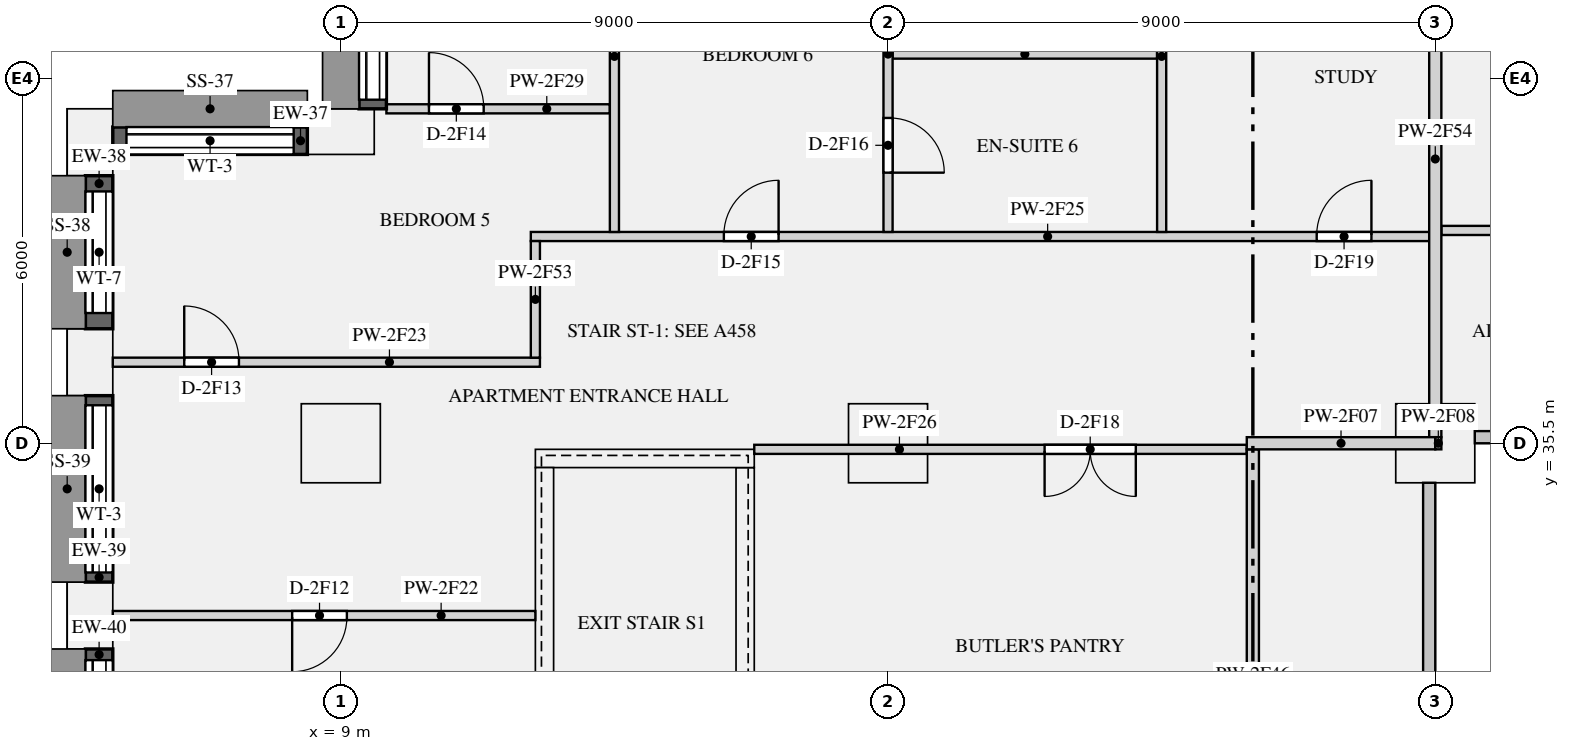
"""IFC4 building model, lengths in metres.
Left out: names, types, materials, properties, quantities, classifications, styles, units other than length and angle.
Written with IfcOpenShell. Run it as: python <this file> out.ifc"""

import sys

from ifc_helpers import new_model, si_unit, direction, frame, frame_2d, origin, origin_2d, place, context, subcontext, project, spatial, rectangle, extrude, element, fill, save


model = new_model("IFC4")
c1 = context("Model", 3, precision=1e-05, world=origin(), true_north=direction((0.0, 1.0)))
c2 = subcontext(c1, "Body", "Model", "MODEL_VIEW")
j1 = project(units=[si_unit("LENGTHUNIT", "METRE"), si_unit("PLANEANGLEUNIT", "RADIAN")], contexts=[c1])
p1 = place(None, origin())
s1 = spatial("IfcSite", under=j1, at=p1, CompositionType="ELEMENT")
p2 = place(p1, origin())
s2 = spatial("IfcBuilding", under=s1, at=p2, CompositionType="ELEMENT")
p3 = place(p2, frame((0.0, 0.0, 127.65)))
s3 = spatial("IfcBuildingStorey", under=s2, at=p3, CompositionType="ELEMENT", Elevation=127.65)
for number, where, z_axis, x_axis in (
    (1, (9.0, 40.625, 0.0), (0.0, 0.0, 1.0), (-1.0, 0.0, 0.0)),
    (2, (4.875, 40.45, 0.0), (0.0, 0.0, 1.0), (0.0, -1.0, 0.0)),
    (3, (4.875, 36.833, 0.0), (0.0, 0.0, 1.0), (0.0, -1.0, 0.0)),
    (4, (4.875, 32.667, 0.0), (0.0, 0.0, 1.0), (0.0, -1.0, 0.0)),
):
    element("IfcColumn", number, at=place(p3, frame(where, z_axis=z_axis, x_axis=x_axis)), inside=s3, PredefinedType="USERDEFINED", context=c2, shape_type="SweptSolid", body=[
        extrude(rectangle(XDim=1.1, YDim=0.75, at=origin_2d()), origin(), (0.0, 0.0, 1.0), 3.15),
    ])
for number, where, z_axis, x_axis in (
    (5, (9.0, 35.5, 0.0), (0.0, 0.0, 1.0), (1.0, 0.0, 0.0)),
    (6, (18.0, 35.5, 0.0), (0.0, 0.0, 1.0), (1.0, 0.0, 0.0)),
    (7, (27.0, 35.5, 0.0), (0.0, 0.0, 1.0), (1.0, 0.0, 0.0)),
):
    element("IfcColumn", number, at=place(p3, frame(where, z_axis=z_axis, x_axis=x_axis)), inside=s3, PredefinedType="COLUMN", context=c2, shape_type="SweptSolid", body=[
        extrude(rectangle(XDim=1.3, YDim=1.3, at=origin_2d()), origin(), (0.0, 0.0, 1.0), 3.15),
    ])
p4 = place(p3, frame((12.2, 35.25, 0.0), z_axis=(0.0, 0.0, 1.0), x_axis=(1.0, 0.0, 0.0)))
e8 = element("IfcWall", 8, at=p4, inside=s3, PredefinedType="SHEAR", context=c2, shape_type="SweptSolid", body=[
    extrude(rectangle(XDim=3.6, YDim=0.3, at=frame_2d((1.8, 0.0))), origin(), (0.0, 0.0, 1.0), 3.15),
])
for number, where, z_axis, x_axis in (
    (9, (12.35, 27.3, 0.0), (0.0, 0.0, 1.0), (0.0, 1.0, 0.0)),
    (10, (15.65, 27.3, 0.0), (0.0, 0.0, 1.0), (0.0, 1.0, 0.0)),
):
    element("IfcWall", number, at=place(p3, frame(where, z_axis=z_axis, x_axis=x_axis)), inside=s3, PredefinedType="SHEAR", context=c2, shape_type="SweptSolid", body=[
        extrude(rectangle(XDim=7.8, YDim=0.3, at=frame_2d((3.9, 0.0))), origin(), (0.0, 0.0, 1.0), 3.15),
    ])
p5 = place(p3, frame((9.525, 44.4, 0.9), z_axis=(0.0, 0.0, 1.0), x_axis=(0.0, -1.0, 0.0)))
e11 = element("IfcWall", 11, at=p5, inside=s3, PredefinedType="SOLIDWALL", context=c2, shape_type="SweptSolid", body=[
    extrude(rectangle(XDim=3.4, YDim=0.45, at=frame_2d((1.7, 0.0))), origin(), (0.0, 0.0, 1.0), 1.75),
])
p6 = place(p5, frame((0.15, 0.0, 0.15)))
e12 = element("IfcOpeningElement", 12, at=p6, cuts=e11, PredefinedType="OPENING", context=c2, shape_type="SweptSolid", body=[
    extrude(rectangle(XDim=3.1, YDim=1.5, at=frame_2d((1.55, 0.75))), frame((0.0, 0.235, 0.0), z_axis=(0.0, -1.0, 0.0), x_axis=(1.0, 0.0, 0.0)), (0.0, 0.0, 1.0), 0.47),
])
p7 = place(p3, frame((8.45, 40.475, 0.9), z_axis=(0.0, 0.0, 1.0), x_axis=(-1.0, 0.0, 0.0)))
e13 = element("IfcWall", 13, at=p7, inside=s3, PredefinedType="SOLIDWALL", context=c2, shape_type="SweptSolid", body=[
    extrude(rectangle(XDim=3.2, YDim=0.45, at=frame_2d((1.6, 0.0))), origin(), (0.0, 0.0, 1.0), 1.75),
])
p8 = place(p7, frame((0.225, 0.0, 0.15)))
e14 = element("IfcOpeningElement", 14, at=p8, cuts=e13, PredefinedType="OPENING", context=c2, shape_type="SweptSolid", body=[
    extrude(rectangle(XDim=2.75, YDim=1.5, at=frame_2d((1.375, 0.75))), frame((0.0, 0.235, 0.0), z_axis=(0.0, -1.0, 0.0), x_axis=(1.0, 0.0, 0.0)), (0.0, 0.0, 1.0), 0.47),
])
p9 = place(p3, frame((5.025, 39.9, 0.9), z_axis=(0.0, 0.0, 1.0), x_axis=(0.0, -1.0, 0.0)))
e15 = element("IfcWall", 15, at=p9, inside=s3, PredefinedType="SOLIDWALL", context=c2, shape_type="SweptSolid", body=[
    extrude(rectangle(XDim=2.517, YDim=0.45, at=frame_2d((1.258, 0.0))), origin(), (0.0, 0.0, 1.0), 1.75),
])
p10 = place(p9, frame((0.259, 0.0, 0.15)))
e16 = element("IfcOpeningElement", 16, at=p10, cuts=e15, PredefinedType="OPENING", context=c2, shape_type="SweptSolid", body=[
    extrude(rectangle(XDim=2.0, YDim=1.5, at=frame_2d((1.0, 0.75))), frame((0.0, 0.235, 0.0), z_axis=(0.0, -1.0, 0.0), x_axis=(1.0, 0.0, 0.0)), (0.0, 0.0, 1.0), 0.47),
])
p11 = place(p3, frame((5.025, 36.283, 0.9), z_axis=(0.0, 0.0, 1.0), x_axis=(0.0, -1.0, 0.0)))
e17 = element("IfcWall", 17, at=p11, inside=s3, PredefinedType="SOLIDWALL", context=c2, shape_type="SweptSolid", body=[
    extrude(rectangle(XDim=3.066, YDim=0.45, at=frame_2d((1.533, 0.0))), origin(), (0.0, 0.0, 1.0), 1.75),
])
p12 = place(p11, frame((0.158, 0.0, 0.15)))
e18 = element("IfcOpeningElement", 18, at=p12, cuts=e17, PredefinedType="OPENING", context=c2, shape_type="SweptSolid", body=[
    extrude(rectangle(XDim=2.75, YDim=1.5, at=frame_2d((1.375, 0.75))), frame((0.0, 0.235, 0.0), z_axis=(0.0, -1.0, 0.0), x_axis=(1.0, 0.0, 0.0)), (0.0, 0.0, 1.0), 0.47),
])
p13 = place(p3, frame((5.025, 32.117, 0.9), z_axis=(0.0, 0.0, 1.0), x_axis=(0.0, -1.0, 0.0)))
e19 = element("IfcWall", 19, at=p13, inside=s3, PredefinedType="SOLIDWALL", context=c2, shape_type="SweptSolid", body=[
    extrude(rectangle(XDim=2.867, YDim=0.45, at=frame_2d((1.434, 0.0))), origin(), (0.0, 0.0, 1.0), 1.75),
])
p14 = place(p13, frame((0.184, 0.0, 0.15)))
e20 = element("IfcOpeningElement", 20, at=p14, cuts=e19, PredefinedType="OPENING", context=c2, shape_type="SweptSolid", body=[
    extrude(rectangle(XDim=2.5, YDim=1.5, at=frame_2d((1.25, 0.75))), frame((0.0, 0.235, 0.0), z_axis=(0.0, -1.0, 0.0), x_axis=(1.0, 0.0, 0.0)), (0.0, 0.0, 1.0), 0.47),
])
p15 = place(p3, frame((23.9, 35.5, 0.0), z_axis=(0.0, 0.0, 1.0), x_axis=(1.0, 0.0, 0.0)))
e21 = element("IfcWall", 21, at=p15, inside=s3, PredefinedType="PARTITIONING", context=c2, shape_type="SweptSolid", body=[
    extrude(rectangle(XDim=3.1, YDim=0.2, at=frame_2d((1.55, 0.0))), origin(), (0.0, 0.0, 1.0), 2.65),
])
p16 = place(p3, frame((27.0, 35.5, 0.0), z_axis=(0.0, 0.0, 1.0), x_axis=(1.0, 0.0, 0.0)))
e22 = element("IfcWall", 22, at=p16, inside=s3, PredefinedType="PARTITIONING", context=c2, shape_type="SweptSolid", body=[
    extrude(rectangle(XDim=0.1, YDim=0.2, at=frame_2d((0.05, 0.0))), origin(), (0.0, 0.0, 1.0), 2.65),
])
p17 = place(p3, frame((5.25, 32.667, 0.0), z_axis=(0.0, 0.0, 1.0), x_axis=(1.0, 0.0, 0.0)))
e23 = element("IfcWall", 23, at=p17, inside=s3, PredefinedType="PARTITIONING", context=c2, shape_type="SweptSolid", body=[
    extrude(rectangle(XDim=6.95, YDim=0.15, at=frame_2d((3.475, 0.0))), origin(), (0.0, 0.0, 1.0), 2.65),
])
p18 = place(p17, frame((2.95, 0.0, 0.0)))
e24 = element("IfcOpeningElement", 24, at=p18, cuts=e23, PredefinedType="OPENING", context=c2, shape_type="SweptSolid", body=[
    extrude(rectangle(XDim=0.9, YDim=2.1, at=frame_2d((0.45, 1.05))), frame((0.0, 0.085, 0.0), z_axis=(0.0, -1.0, 0.0), x_axis=(1.0, 0.0, 0.0)), (0.0, 0.0, 1.0), 0.17),
])
p19 = place(p3, frame((5.25, 36.833, 0.0), z_axis=(0.0, 0.0, 1.0), x_axis=(1.0, 0.0, 0.0)))
e25 = element("IfcWall", 25, at=p19, inside=s3, PredefinedType="PARTITIONING", context=c2, shape_type="SweptSolid", body=[
    extrude(rectangle(XDim=7.025, YDim=0.15, at=frame_2d((3.512, 0.0))), origin(), (0.0, 0.0, 1.0), 2.65),
])
p20 = place(p19, frame((1.175, 0.0, 0.0)))
e26 = element("IfcOpeningElement", 26, at=p20, cuts=e25, PredefinedType="OPENING", context=c2, shape_type="SweptSolid", body=[
    extrude(rectangle(XDim=0.9, YDim=2.1, at=frame_2d((0.45, 1.05))), frame((0.0, 0.085, 0.0), z_axis=(0.0, -1.0, 0.0), x_axis=(1.0, 0.0, 0.0)), (0.0, 0.0, 1.0), 0.17),
])
p21 = place(p3, frame((12.125, 38.9, 0.0), z_axis=(0.0, 0.0, 1.0), x_axis=(1.0, 0.0, 0.0)))
e27 = element("IfcWall", 27, at=p21, inside=s3, PredefinedType="PARTITIONING", context=c2, shape_type="SweptSolid", body=[
    extrude(rectangle(XDim=14.775, YDim=0.15, at=frame_2d((7.387, 0.0))), origin(), (0.0, 0.0, 1.0), 2.65),
])
p22 = place(p21, frame((3.175, 0.0, 0.0)))
e28 = element("IfcOpeningElement", 28, at=p22, cuts=e27, PredefinedType="OPENING", context=c2, shape_type="SweptSolid", body=[
    extrude(rectangle(XDim=0.9, YDim=2.1, at=frame_2d((0.45, 1.05))), frame((0.0, 0.085, 0.0), z_axis=(0.0, -1.0, 0.0), x_axis=(1.0, 0.0, 0.0)), (0.0, 0.0, 1.0), 0.17),
])
p23 = place(p21, frame((12.925, 0.0, 0.0)))
e29 = element("IfcOpeningElement", 29, at=p23, cuts=e27, PredefinedType="OPENING", context=c2, shape_type="SweptSolid", body=[
    extrude(rectangle(XDim=0.9, YDim=2.1, at=frame_2d((0.45, 1.05))), frame((0.0, 0.085, 0.0), z_axis=(0.0, -1.0, 0.0), x_axis=(1.0, 0.0, 0.0)), (0.0, 0.0, 1.0), 0.17),
])
p24 = place(p3, frame((15.8, 35.4, 0.0), z_axis=(0.0, 0.0, 1.0), x_axis=(1.0, 0.0, 0.0)))
e30 = element("IfcWall", 30, at=p24, inside=s3, PredefinedType="PARTITIONING", context=c2, shape_type="SweptSolid", body=[
    extrude(rectangle(XDim=8.1, YDim=0.15, at=frame_2d((4.05, 0.0))), origin(), (0.0, 0.0, 1.0), 2.65),
])
p25 = place(p24, frame((4.775, 0.0, 0.0)))
e31 = element("IfcOpeningElement", 31, at=p25, cuts=e30, PredefinedType="OPENING", context=c2, shape_type="SweptSolid", body=[
    extrude(rectangle(XDim=1.5, YDim=2.1, at=frame_2d((0.75, 1.05))), frame((0.0, 0.085, 0.0), z_axis=(0.0, -1.0, 0.0), x_axis=(1.0, 0.0, 0.0)), (0.0, 0.0, 1.0), 0.17),
])
p26 = place(p3, frame((9.75, 41.0, 0.0), z_axis=(0.0, 0.0, 1.0), x_axis=(1.0, 0.0, 0.0)))
e32 = element("IfcWall", 32, at=p26, inside=s3, PredefinedType="PARTITIONING", context=c2, shape_type="SweptSolid", body=[
    extrude(rectangle(XDim=3.675, YDim=0.15, at=frame_2d((1.837, 0.0))), origin(), (0.0, 0.0, 1.0), 2.65),
])
p27 = place(p26, frame((0.7, 0.0, 0.0)))
e33 = element("IfcOpeningElement", 33, at=p27, cuts=e32, PredefinedType="OPENING", context=c2, shape_type="SweptSolid", body=[
    extrude(rectangle(XDim=0.9, YDim=2.1, at=frame_2d((0.45, 1.05))), frame((0.0, 0.085, 0.0), z_axis=(0.0, -1.0, 0.0), x_axis=(1.0, 0.0, 0.0)), (0.0, 0.0, 1.0), 0.17),
])
p28 = place(p3, frame((18.075, 41.9, 0.0), z_axis=(0.0, 0.0, 1.0), x_axis=(1.0, 0.0, 0.0)))
e34 = element("IfcWall", 34, at=p28, inside=s3, PredefinedType="PARTITIONING", context=c2, shape_type="SweptSolid", body=[
    extrude(rectangle(XDim=4.35, YDim=0.15, at=frame_2d((2.175, 0.0))), origin(), (0.0, 0.0, 1.0), 2.65),
])
p29 = place(p3, frame((27.1, 39.0, 0.0), z_axis=(0.0, 0.0, 1.0), x_axis=(1.0, 0.0, 0.0)))
e35 = element("IfcWall", 35, at=p29, inside=s3, PredefinedType="PARTITIONING", context=c2, shape_type="SweptSolid", body=[
    extrude(rectangle(XDim=22.475, YDim=0.15, at=frame_2d((11.237, 0.0))), origin(), (0.0, 0.0, 1.0), 2.65),
])
p30 = place(p29, frame((1.7, 0.0, 0.0)))
e36 = element("IfcOpeningElement", 36, at=p30, cuts=e35, PredefinedType="OPENING", context=c2, shape_type="SweptSolid", body=[
    extrude(rectangle(XDim=0.9, YDim=2.1, at=frame_2d((0.45, 1.05))), frame((0.0, 0.085, 0.0), z_axis=(0.0, -1.0, 0.0), x_axis=(1.0, 0.0, 0.0)), (0.0, 0.0, 1.0), 0.17),
])
p31 = place(p29, frame((6.2, 0.0, 0.0)))
e37 = element("IfcOpeningElement", 37, at=p31, cuts=e35, PredefinedType="OPENING", context=c2, shape_type="SweptSolid", body=[
    extrude(rectangle(XDim=0.9, YDim=2.1, at=frame_2d((0.45, 1.05))), frame((0.0, 0.085, 0.0), z_axis=(0.0, -1.0, 0.0), x_axis=(1.0, 0.0, 0.0)), (0.0, 0.0, 1.0), 0.17),
])
p32 = place(p29, frame((12.95, 0.0, 0.0)))
e38 = element("IfcOpeningElement", 38, at=p32, cuts=e35, PredefinedType="OPENING", context=c2, shape_type="SweptSolid", body=[
    extrude(rectangle(XDim=0.9, YDim=2.1, at=frame_2d((0.45, 1.05))), frame((0.0, 0.085, 0.0), z_axis=(0.0, -1.0, 0.0), x_axis=(1.0, 0.0, 0.0)), (0.0, 0.0, 1.0), 0.17),
])
p33 = place(p3, frame((18.0, 38.975, 0.0), z_axis=(0.0, 0.0, 1.0), x_axis=(0.0, 1.0, 0.0)))
e39 = element("IfcWall", 39, at=p33, inside=s3, PredefinedType="PARTITIONING", context=c2, shape_type="SweptSolid", body=[
    extrude(rectangle(XDim=5.775, YDim=0.15, at=frame_2d((2.887, 0.0))), origin(), (0.0, 0.0, 1.0), 2.65),
])
p34 = place(p33, frame((0.975, 0.0, 0.0)))
e40 = element("IfcOpeningElement", 40, at=p34, cuts=e39, PredefinedType="OPENING", context=c2, shape_type="SweptSolid", body=[
    extrude(rectangle(XDim=0.9, YDim=2.1, at=frame_2d((0.45, 1.05))), frame((0.0, 0.085, 0.0), z_axis=(0.0, -1.0, 0.0), x_axis=(1.0, 0.0, 0.0)), (0.0, 0.0, 1.0), 0.17),
])
p35 = place(p33, frame((3.975, 0.0, 0.0)))
e41 = element("IfcOpeningElement", 41, at=p35, cuts=e39, PredefinedType="OPENING", context=c2, shape_type="SweptSolid", body=[
    extrude(rectangle(XDim=0.9, YDim=2.1, at=frame_2d((0.45, 1.05))), frame((0.0, 0.085, 0.0), z_axis=(0.0, -1.0, 0.0), x_axis=(1.0, 0.0, 0.0)), (0.0, 0.0, 1.0), 0.17),
])
p36 = place(p3, frame((24.0, 27.1, 0.0), z_axis=(0.0, 0.0, 1.0), x_axis=(0.0, 1.0, 0.0)))
e42 = element("IfcWall", 42, at=p36, inside=s3, PredefinedType="PARTITIONING", context=c2, shape_type="SweptSolid", body=[
    extrude(rectangle(XDim=8.3, YDim=0.2, at=frame_2d((4.15, 0.0))), origin(), (0.0, 0.0, 1.0), 2.65),
])
p37 = place(p3, frame((13.5, 38.975, 0.0), z_axis=(0.0, 0.0, 1.0), x_axis=(0.0, 1.0, 0.0)))
e43 = element("IfcWall", 43, at=p37, inside=s3, PredefinedType="PARTITIONING", context=c2, shape_type="SweptSolid", body=[
    extrude(rectangle(XDim=5.775, YDim=0.15, at=frame_2d((2.887, 0.0))), origin(), (0.0, 0.0, 1.0), 2.65),
])
p38 = place(p3, frame((12.2, 36.908, 0.0), z_axis=(0.0, 0.0, 1.0), x_axis=(0.0, 1.0, 0.0)))
e44 = element("IfcWall", 44, at=p38, inside=s3, PredefinedType="PARTITIONING", context=c2, shape_type="SweptSolid", body=[
    extrude(rectangle(XDim=1.917, YDim=0.15, at=frame_2d((0.958, 0.0))), origin(), (0.0, 0.0, 1.0), 2.65),
])
p39 = place(p3, frame((27.0, 35.6, 0.0), z_axis=(0.0, 0.0, 1.0), x_axis=(0.0, 1.0, 0.0)))
e45 = element("IfcWall", 45, at=p39, inside=s3, PredefinedType="PARTITIONING", context=c2, shape_type="SweptSolid", body=[
    extrude(rectangle(XDim=9.15, YDim=0.2, at=frame_2d((4.575, 0.0))), origin(), (0.0, 0.0, 1.0), 2.65),
])
p40 = place(p3, frame((22.5, 38.975, 0.0), z_axis=(0.0, 0.0, 1.0), x_axis=(0.0, 1.0, 0.0)))
e46 = element("IfcWall", 46, at=p40, inside=s3, PredefinedType="PARTITIONING", context=c2, shape_type="SweptSolid", body=[
    extrude(rectangle(XDim=5.775, YDim=0.15, at=frame_2d((2.887, 0.0))), origin(), (0.0, 0.0, 1.0), 2.65),
])
p41 = place(p6, origin())
e47 = element("IfcWindow", 47, at=p41, inside=s3, PartitioningType="SINGLE_PANEL", PredefinedType="WINDOW", context=c2, shape_type="SweptSolid", body=[
    extrude(rectangle(XDim=3.1, YDim=1.5, at=frame_2d((1.55, 0.75))), frame((0.0, -0.065, 0.0), z_axis=(0.0, -1.0, 0.0), x_axis=(1.0, 0.0, 0.0)), (0.0, 0.0, 1.0), 0.06),
])
fill(e12, e47)
p42 = place(p8, origin())
e48 = element("IfcWindow", 48, at=p42, inside=s3, PartitioningType="SINGLE_PANEL", PredefinedType="WINDOW", context=c2, shape_type="SweptSolid", body=[
    extrude(rectangle(XDim=2.75, YDim=1.5, at=frame_2d((1.375, 0.75))), frame((0.0, -0.065, 0.0), z_axis=(0.0, -1.0, 0.0), x_axis=(1.0, 0.0, 0.0)), (0.0, 0.0, 1.0), 0.06),
])
fill(e14, e48)
p43 = place(p10, origin())
e49 = element("IfcWindow", 49, at=p43, inside=s3, PartitioningType="SINGLE_PANEL", PredefinedType="WINDOW", context=c2, shape_type="SweptSolid", body=[
    extrude(rectangle(XDim=2.0, YDim=1.5, at=frame_2d((1.0, 0.75))), frame((0.0, -0.065, 0.0), z_axis=(0.0, -1.0, 0.0), x_axis=(1.0, 0.0, 0.0)), (0.0, 0.0, 1.0), 0.06),
])
fill(e16, e49)
p44 = place(p12, origin())
e50 = element("IfcWindow", 50, at=p44, inside=s3, PartitioningType="SINGLE_PANEL", PredefinedType="WINDOW", context=c2, shape_type="SweptSolid", body=[
    extrude(rectangle(XDim=2.75, YDim=1.5, at=frame_2d((1.375, 0.75))), frame((0.0, -0.065, 0.0), z_axis=(0.0, -1.0, 0.0), x_axis=(1.0, 0.0, 0.0)), (0.0, 0.0, 1.0), 0.06),
])
fill(e18, e50)
p45 = place(p14, origin())
e51 = element("IfcWindow", 51, at=p45, inside=s3, PartitioningType="SINGLE_PANEL", PredefinedType="WINDOW", context=c2, shape_type="SweptSolid", body=[
    extrude(rectangle(XDim=2.5, YDim=1.5, at=frame_2d((1.25, 0.75))), frame((0.0, -0.065, 0.0), z_axis=(0.0, -1.0, 0.0), x_axis=(1.0, 0.0, 0.0)), (0.0, 0.0, 1.0), 0.06),
])
fill(e20, e51)
p46 = place(p18, frame((0.9, 0.0, 0.0), z_axis=(0.0, 0.0, 1.0), x_axis=(-1.0, 0.0, 0.0)))
e52 = element("IfcDoor", 52, at=p46, inside=s3, OperationType="SINGLE_SWING_RIGHT", PredefinedType="DOOR", context=c2, shape_type="SweptSolid", body=[
    extrude(rectangle(XDim=0.9, YDim=2.1, at=frame_2d((0.45, 1.05))), frame((0.0, 0.025, 0.0), z_axis=(0.0, -1.0, 0.0), x_axis=(1.0, 0.0, 0.0)), (0.0, 0.0, 1.0), 0.05),
])
fill(e24, e52)
p47 = place(p20, origin())
e53 = element("IfcDoor", 53, at=p47, inside=s3, OperationType="SINGLE_SWING_LEFT", PredefinedType="DOOR", context=c2, shape_type="SweptSolid", body=[
    extrude(rectangle(XDim=0.9, YDim=2.1, at=frame_2d((0.45, 1.05))), frame((0.0, 0.025, 0.0), z_axis=(0.0, -1.0, 0.0), x_axis=(1.0, 0.0, 0.0)), (0.0, 0.0, 1.0), 0.05),
])
fill(e26, e53)
p48 = place(p27, origin())
e54 = element("IfcDoor", 54, at=p48, inside=s3, OperationType="SINGLE_SWING_LEFT", PredefinedType="DOOR", context=c2, shape_type="SweptSolid", body=[
    extrude(rectangle(XDim=0.9, YDim=2.1, at=frame_2d((0.45, 1.05))), frame((0.0, 0.025, 0.0), z_axis=(0.0, -1.0, 0.0), x_axis=(1.0, 0.0, 0.0)), (0.0, 0.0, 1.0), 0.05),
])
fill(e33, e54)
p49 = place(p22, origin())
e55 = element("IfcDoor", 55, at=p49, inside=s3, OperationType="SINGLE_SWING_RIGHT", PredefinedType="DOOR", context=c2, shape_type="SweptSolid", body=[
    extrude(rectangle(XDim=0.9, YDim=2.1, at=frame_2d((0.45, 1.05))), frame((0.0, 0.025, 0.0), z_axis=(0.0, -1.0, 0.0), x_axis=(1.0, 0.0, 0.0)), (0.0, 0.0, 1.0), 0.05),
])
fill(e28, e55)
p50 = place(p34, frame((0.9, 0.0, 0.0), z_axis=(0.0, 0.0, 1.0), x_axis=(-1.0, 0.0, 0.0)))
e56 = element("IfcDoor", 56, at=p50, inside=s3, OperationType="SINGLE_SWING_RIGHT", PredefinedType="DOOR", context=c2, shape_type="SweptSolid", body=[
    extrude(rectangle(XDim=0.9, YDim=2.1, at=frame_2d((0.45, 1.05))), frame((0.0, 0.025, 0.0), z_axis=(0.0, -1.0, 0.0), x_axis=(1.0, 0.0, 0.0)), (0.0, 0.0, 1.0), 0.05),
])
fill(e40, e56)
p51 = place(p25, frame((1.5, 0.0, 0.0), z_axis=(0.0, 0.0, 1.0), x_axis=(-1.0, 0.0, 0.0)))
e57 = element("IfcDoor", 57, at=p51, inside=s3, OperationType="DOUBLE_DOOR_SINGLE_SWING", PredefinedType="DOOR", context=c2, shape_type="SweptSolid", body=[
    extrude(rectangle(XDim=1.5, YDim=2.1, at=frame_2d((0.75, 1.05))), frame((0.0, 0.025, 0.0), z_axis=(0.0, -1.0, 0.0), x_axis=(1.0, 0.0, 0.0)), (0.0, 0.0, 1.0), 0.05),
])
fill(e31, e57)
p52 = place(p23, origin())
e58 = element("IfcDoor", 58, at=p52, inside=s3, OperationType="SINGLE_SWING_RIGHT", PredefinedType="DOOR", context=c2, shape_type="SweptSolid", body=[
    extrude(rectangle(XDim=0.9, YDim=2.1, at=frame_2d((0.45, 1.05))), frame((0.0, 0.025, 0.0), z_axis=(0.0, -1.0, 0.0), x_axis=(1.0, 0.0, 0.0)), (0.0, 0.0, 1.0), 0.05),
])
fill(e29, e58)
save(model, sys.argv[1])
